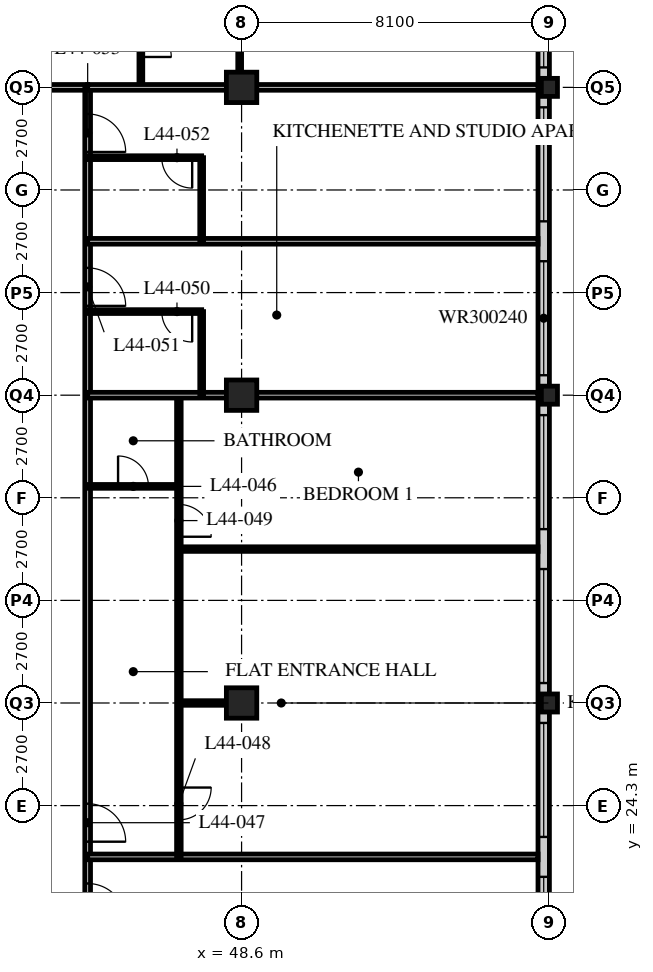
"""IFC4 building model, lengths in metres.
Left out: names, types, materials, properties, quantities, classifications, styles, units other than length and angle.
Written with IfcOpenShell. Run it as: python <this file> out.ifc"""

import sys

from ifc_helpers import new_model, si_unit, direction, frame, frame_2d, origin, origin_2d, place, context, subcontext, project, spatial, rectangle, hollow_rectangle, i_section, extrude, element, fill, save


model = new_model("IFC4")
c1 = context("Model", 3, precision=1e-05, world=origin(), true_north=direction((0.0, 1.0)))
c2 = subcontext(c1, "Body", "Model", "MODEL_VIEW")
j1 = project(units=[si_unit("LENGTHUNIT", "METRE"), si_unit("PLANEANGLEUNIT", "RADIAN")], contexts=[c1])
p1 = place(None, origin())
s1 = spatial("IfcSite", under=j1, at=p1, CompositionType="ELEMENT")
p2 = place(p1, origin())
s2 = spatial("IfcBuilding", under=s1, at=p2, CompositionType="ELEMENT")
p3 = place(p2, frame((0.0, 0.0, 174.0)))
s3 = spatial("IfcBuildingStorey", under=s2, at=p3, CompositionType="ELEMENT", Elevation=174.0)
for number, where, z_axis, x_axis in (
    (1, (48.6, 27.0, 0.0), (0.0, 0.0, 1.0), (1.0, 0.0, 0.0)),
    (2, (48.6, 35.1, 0.0), (0.0, 0.0, 1.0), (1.0, 0.0, 0.0)),
    (3, (48.6, 43.2, 0.0), (0.0, 0.0, 1.0), (1.0, 0.0, 0.0)),
):
    element("IfcColumn", number, at=place(p3, frame(where, z_axis=z_axis, x_axis=x_axis)), inside=s3, PredefinedType="COLUMN", context=c2, shape_type="SweptSolid", body=[
        extrude(hollow_rectangle(XDim=0.8, YDim=0.8, WallThickness=0.08, at=origin_2d()), origin(), (0.0, 0.0, 1.0), 3.6),
    ])
for number, where, z_axis, x_axis in (
    (4, (56.7, 27.0, 0.0), (0.0, 0.0, 1.0), (1.0, 0.0, 0.0)),
    (5, (56.7, 35.1, 0.0), (0.0, 0.0, 1.0), (1.0, 0.0, 0.0)),
    (6, (56.7, 43.2, 0.0), (0.0, 0.0, 1.0), (1.0, 0.0, 0.0)),
):
    element("IfcColumn", number, at=place(p3, frame(where, z_axis=z_axis, x_axis=x_axis)), inside=s3, PredefinedType="COLUMN", context=c2, shape_type="SweptSolid", body=[
        extrude(i_section(OverallWidth=0.424, OverallDepth=0.475, WebThickness=0.048, FlangeThickness=0.077, FilletRadius=0.015, at=origin_2d()), origin(), (0.0, 0.0, 1.0), 3.6),
    ])
p4 = place(p3, frame((56.55, 19.2, 0.0), z_axis=(0.0, 0.0, 1.0), x_axis=(0.0, 1.0, 0.0)))
e7 = element("IfcWall", 7, at=p4, inside=s3, PredefinedType="SOLIDWALL", context=c2, shape_type="SweptSolid", body=[
    extrude(rectangle(XDim=32.1, YDim=0.3, at=frame_2d((16.05, 0.0))), origin(), (0.0, 0.0, 1.0), 3.39),
])
p5 = place(p4, frame((0.225, 0.0, 0.6)))
e8 = element("IfcOpeningElement", 8, at=p5, cuts=e7, PredefinedType="OPENING", context=c2, shape_type="SweptSolid", body=[
    extrude(rectangle(XDim=3.0, YDim=2.4, at=frame_2d((1.5, 1.2))), frame((0.0, 0.16, 0.0), z_axis=(0.0, -1.0, 0.0), x_axis=(1.0, 0.0, 0.0)), (0.0, 0.0, 1.0), 0.32),
])
p6 = place(p4, frame((4.275, 0.0, 0.6)))
e9 = element("IfcOpeningElement", 9, at=p6, cuts=e7, PredefinedType="OPENING", context=c2, shape_type="SweptSolid", body=[
    extrude(rectangle(XDim=3.0, YDim=2.4, at=frame_2d((1.5, 1.2))), frame((0.0, 0.16, 0.0), z_axis=(0.0, -1.0, 0.0), x_axis=(1.0, 0.0, 0.0)), (0.0, 0.0, 1.0), 0.32),
])
p7 = place(p4, frame((8.325, 0.0, 0.6)))
e10 = element("IfcOpeningElement", 10, at=p7, cuts=e7, PredefinedType="OPENING", context=c2, shape_type="SweptSolid", body=[
    extrude(rectangle(XDim=3.0, YDim=2.4, at=frame_2d((1.5, 1.2))), frame((0.0, 0.16, 0.0), z_axis=(0.0, -1.0, 0.0), x_axis=(1.0, 0.0, 0.0)), (0.0, 0.0, 1.0), 0.32),
])
p8 = place(p4, frame((12.375, 0.0, 0.6)))
e11 = element("IfcOpeningElement", 11, at=p8, cuts=e7, PredefinedType="OPENING", context=c2, shape_type="SweptSolid", body=[
    extrude(rectangle(XDim=3.0, YDim=2.4, at=frame_2d((1.5, 1.2))), frame((0.0, 0.16, 0.0), z_axis=(0.0, -1.0, 0.0), x_axis=(1.0, 0.0, 0.0)), (0.0, 0.0, 1.0), 0.32),
])
p9 = place(p4, frame((16.425, 0.0, 0.6)))
e12 = element("IfcOpeningElement", 12, at=p9, cuts=e7, PredefinedType="OPENING", context=c2, shape_type="SweptSolid", body=[
    extrude(rectangle(XDim=3.0, YDim=2.4, at=frame_2d((1.5, 1.2))), frame((0.0, 0.16, 0.0), z_axis=(0.0, -1.0, 0.0), x_axis=(1.0, 0.0, 0.0)), (0.0, 0.0, 1.0), 0.32),
])
p10 = place(p4, frame((20.475, 0.0, 0.6)))
e13 = element("IfcOpeningElement", 13, at=p10, cuts=e7, PredefinedType="OPENING", context=c2, shape_type="SweptSolid", body=[
    extrude(rectangle(XDim=3.0, YDim=2.4, at=frame_2d((1.5, 1.2))), frame((0.0, 0.16, 0.0), z_axis=(0.0, -1.0, 0.0), x_axis=(1.0, 0.0, 0.0)), (0.0, 0.0, 1.0), 0.32),
])
p11 = place(p4, frame((24.525, 0.0, 0.6)))
e14 = element("IfcOpeningElement", 14, at=p11, cuts=e7, PredefinedType="OPENING", context=c2, shape_type="SweptSolid", body=[
    extrude(rectangle(XDim=3.0, YDim=2.4, at=frame_2d((1.5, 1.2))), frame((0.0, 0.16, 0.0), z_axis=(0.0, -1.0, 0.0), x_axis=(1.0, 0.0, 0.0)), (0.0, 0.0, 1.0), 0.32),
])
p12 = place(p4, frame((28.575, 0.0, 0.6)))
e15 = element("IfcOpeningElement", 15, at=p12, cuts=e7, PredefinedType="OPENING", context=c2, shape_type="SweptSolid", body=[
    extrude(rectangle(XDim=3.0, YDim=2.4, at=frame_2d((1.5, 1.2))), frame((0.0, 0.16, 0.0), z_axis=(0.0, -1.0, 0.0), x_axis=(1.0, 0.0, 0.0)), (0.0, 0.0, 1.0), 0.32),
])
p13 = place(p3, frame((12.15, 43.2, 0.0), z_axis=(0.0, 0.0, 1.0), x_axis=(1.0, 0.0, 0.0)))
e16 = element("IfcWall", 16, at=p13, inside=s3, PredefinedType="PARTITIONING", context=c2, shape_type="SweptSolid", body=[
    extrude(rectangle(XDim=32.4, YDim=0.15, at=frame_2d((16.2, 0.0))), origin(), (0.0, 0.0, 1.0), 2.778),
])
p14 = place(p13, frame((4.95, 0.0, 0.0)))
e17 = element("IfcOpeningElement", 17, at=p14, cuts=e16, PredefinedType="OPENING", context=c2, shape_type="SweptSolid", body=[
    extrude(rectangle(XDim=1.0, YDim=2.1, at=frame_2d((0.5, 1.05))), frame((0.0, 0.085, 0.0), z_axis=(0.0, -1.0, 0.0), x_axis=(1.0, 0.0, 0.0)), (0.0, 0.0, 1.0), 0.17),
])
p15 = place(p13, frame((13.05, 0.0, 0.0)))
e18 = element("IfcOpeningElement", 18, at=p15, cuts=e16, PredefinedType="OPENING", context=c2, shape_type="SweptSolid", body=[
    extrude(rectangle(XDim=1.0, YDim=2.1, at=frame_2d((0.5, 1.05))), frame((0.0, 0.085, 0.0), z_axis=(0.0, -1.0, 0.0), x_axis=(1.0, 0.0, 0.0)), (0.0, 0.0, 1.0), 0.17),
])
p16 = place(p13, frame((21.15, 0.0, 0.0)))
e19 = element("IfcOpeningElement", 19, at=p16, cuts=e16, PredefinedType="OPENING", context=c2, shape_type="SweptSolid", body=[
    extrude(rectangle(XDim=1.0, YDim=2.1, at=frame_2d((0.5, 1.05))), frame((0.0, 0.085, 0.0), z_axis=(0.0, -1.0, 0.0), x_axis=(1.0, 0.0, 0.0)), (0.0, 0.0, 1.0), 0.17),
])
p17 = place(p13, frame((29.875, 0.0, 0.0)))
e20 = element("IfcOpeningElement", 20, at=p17, cuts=e16, PredefinedType="OPENING", context=c2, shape_type="SweptSolid", body=[
    extrude(rectangle(XDim=1.0, YDim=2.1, at=frame_2d((0.5, 1.05))), frame((0.0, 0.085, 0.0), z_axis=(0.0, -1.0, 0.0), x_axis=(1.0, 0.0, 0.0)), (0.0, 0.0, 1.0), 0.17),
])
p18 = place(p13, frame((1.525, 0.0, 0.0)))
e21 = element("IfcOpeningElement", 21, at=p18, cuts=e16, PredefinedType="OPENING", context=c2, shape_type="SweptSolid", body=[
    extrude(rectangle(XDim=1.0, YDim=2.1, at=frame_2d((0.5, 1.05))), frame((0.0, 0.085, 0.0), z_axis=(0.0, -1.0, 0.0), x_axis=(1.0, 0.0, 0.0)), (0.0, 0.0, 1.0), 0.17),
])
p19 = place(p3, frame((44.55, 18.9, 0.0), z_axis=(0.0, 0.0, 1.0), x_axis=(0.0, 1.0, 0.0)))
e22 = element("IfcWall", 22, at=p19, inside=s3, PredefinedType="PARTITIONING", context=c2, shape_type="SweptSolid", body=[
    extrude(rectangle(XDim=24.3, YDim=0.15, at=frame_2d((12.15, 0.0))), origin(), (0.0, 0.0, 1.0), 3.39),
])
p20 = place(p19, frame((2.35, 0.0, 0.0)))
e23 = element("IfcOpeningElement", 23, at=p20, cuts=e22, PredefinedType="OPENING", context=c2, shape_type="SweptSolid", body=[
    extrude(rectangle(XDim=1.0, YDim=2.1, at=frame_2d((0.5, 1.05))), frame((0.0, 0.085, 0.0), z_axis=(0.0, -1.0, 0.0), x_axis=(1.0, 0.0, 0.0)), (0.0, 0.0, 1.0), 0.17),
])
p21 = place(p19, frame((4.45, 0.0, 0.0)))
e24 = element("IfcOpeningElement", 24, at=p21, cuts=e22, PredefinedType="OPENING", context=c2, shape_type="SweptSolid", body=[
    extrude(rectangle(XDim=1.0, YDim=2.1, at=frame_2d((0.5, 1.05))), frame((0.0, 0.085, 0.0), z_axis=(0.0, -1.0, 0.0), x_axis=(1.0, 0.0, 0.0)), (0.0, 0.0, 1.0), 0.17),
])
p22 = place(p19, frame((18.55, 0.0, 0.0)))
e25 = element("IfcOpeningElement", 25, at=p22, cuts=e22, PredefinedType="OPENING", context=c2, shape_type="SweptSolid", body=[
    extrude(rectangle(XDim=1.0, YDim=2.1, at=frame_2d((0.5, 1.05))), frame((0.0, 0.085, 0.0), z_axis=(0.0, -1.0, 0.0), x_axis=(1.0, 0.0, 0.0)), (0.0, 0.0, 1.0), 0.17),
])
p23 = place(p19, frame((22.6, 0.0, 0.0)))
e26 = element("IfcOpeningElement", 26, at=p23, cuts=e22, PredefinedType="OPENING", context=c2, shape_type="SweptSolid", body=[
    extrude(rectangle(XDim=1.0, YDim=2.1, at=frame_2d((0.5, 1.05))), frame((0.0, 0.085, 0.0), z_axis=(0.0, -1.0, 0.0), x_axis=(1.0, 0.0, 0.0)), (0.0, 0.0, 1.0), 0.17),
])
p24 = place(p3, frame((44.55, 22.95, 0.0), z_axis=(0.0, 0.0, 1.0), x_axis=(1.0, 0.0, 0.0)))
e27 = element("IfcWall", 27, at=p24, inside=s3, PredefinedType="PARTITIONING", context=c2, shape_type="SweptSolid", body=[
    extrude(rectangle(XDim=11.85, YDim=0.15, at=frame_2d((5.925, 0.0))), origin(), (0.0, 0.0, 1.0), 3.39),
])
p25 = place(p3, frame((46.95, 22.95, 0.0), z_axis=(0.0, 0.0, 1.0), x_axis=(0.0, 1.0, 0.0)))
e28 = element("IfcWall", 28, at=p25, inside=s3, PredefinedType="PARTITIONING", context=c2, shape_type="SweptSolid", body=[
    extrude(rectangle(XDim=12.15, YDim=0.12, at=frame_2d((6.075, 0.0))), origin(), (0.0, 0.0, 1.0), 3.39),
])
p26 = place(p25, frame((0.975, 0.0, 0.0)))
e29 = element("IfcOpeningElement", 29, at=p26, cuts=e28, PredefinedType="OPENING", context=c2, shape_type="SweptSolid", body=[
    extrude(rectangle(XDim=0.85, YDim=2.1, at=frame_2d((0.425, 1.05))), frame((0.0, 0.07, 0.0), z_axis=(0.0, -1.0, 0.0), x_axis=(1.0, 0.0, 0.0)), (0.0, 0.0, 1.0), 0.14),
])
p27 = place(p25, frame((8.425, 0.0, 0.0)))
e30 = element("IfcOpeningElement", 30, at=p27, cuts=e28, PredefinedType="OPENING", context=c2, shape_type="SweptSolid", body=[
    extrude(rectangle(XDim=0.85, YDim=2.1, at=frame_2d((0.425, 1.05))), frame((0.0, 0.07, 0.0), z_axis=(0.0, -1.0, 0.0), x_axis=(1.0, 0.0, 0.0)), (0.0, 0.0, 1.0), 0.14),
])
p28 = place(p3, frame((44.55, 32.7, 0.0), z_axis=(0.0, 0.0, 1.0), x_axis=(1.0, 0.0, 0.0)))
e31 = element("IfcWall", 31, at=p28, inside=s3, PredefinedType="PARTITIONING", context=c2, shape_type="SweptSolid", body=[
    extrude(rectangle(XDim=2.4, YDim=0.1, at=frame_2d((1.2, 0.0))), origin(), (0.0, 0.0, 1.0), 3.39),
])
p29 = place(p28, frame((0.8, 0.0, 0.0)))
e32 = element("IfcOpeningElement", 32, at=p29, cuts=e31, PredefinedType="OPENING", context=c2, shape_type="SweptSolid", body=[
    extrude(rectangle(XDim=0.8, YDim=2.1, at=frame_2d((0.4, 1.05))), frame((0.0, 0.06, 0.0), z_axis=(0.0, -1.0, 0.0), x_axis=(1.0, 0.0, 0.0)), (0.0, 0.0, 1.0), 0.12),
])
p30 = place(p3, frame((46.95, 31.05, 0.0), z_axis=(0.0, 0.0, 1.0), x_axis=(1.0, 0.0, 0.0)))
e33 = element("IfcWall", 33, at=p30, inside=s3, PredefinedType="PARTITIONING", context=c2, shape_type="SweptSolid", body=[
    extrude(rectangle(XDim=9.45, YDim=0.12, at=frame_2d((4.725, 0.0))), origin(), (0.0, 0.0, 1.0), 3.39),
])
p31 = place(p3, frame((44.55, 35.1, 0.0), z_axis=(0.0, 0.0, 1.0), x_axis=(1.0, 0.0, 0.0)))
e34 = element("IfcWall", 34, at=p31, inside=s3, PredefinedType="PARTITIONING", context=c2, shape_type="SweptSolid", body=[
    extrude(rectangle(XDim=11.85, YDim=0.15, at=frame_2d((5.925, 0.0))), origin(), (0.0, 0.0, 1.0), 2.778),
])
p32 = place(p3, frame((47.55, 35.1, 0.0), z_axis=(0.0, 0.0, 1.0), x_axis=(0.0, 1.0, 0.0)))
e35 = element("IfcWall", 35, at=p32, inside=s3, PredefinedType="PARTITIONING", context=c2, shape_type="SweptSolid", body=[
    extrude(rectangle(XDim=2.2, YDim=0.1, at=frame_2d((1.1, 0.0))), origin(), (0.0, 0.0, 1.0), 3.39),
])
p33 = place(p3, frame((44.55, 37.3, 0.0), z_axis=(0.0, 0.0, 1.0), x_axis=(1.0, 0.0, 0.0)))
e36 = element("IfcWall", 36, at=p33, inside=s3, PredefinedType="PARTITIONING", context=c2, shape_type="SweptSolid", body=[
    extrude(rectangle(XDim=3.0, YDim=0.1, at=frame_2d((1.5, 0.0))), origin(), (0.0, 0.0, 1.0), 3.39),
])
p34 = place(p33, frame((1.95, 0.0, 0.0)))
e37 = element("IfcOpeningElement", 37, at=p34, cuts=e36, PredefinedType="OPENING", context=c2, shape_type="SweptSolid", body=[
    extrude(rectangle(XDim=0.8, YDim=2.1, at=frame_2d((0.4, 1.05))), frame((0.0, 0.06, 0.0), z_axis=(0.0, -1.0, 0.0), x_axis=(1.0, 0.0, 0.0)), (0.0, 0.0, 1.0), 0.12),
])
p35 = place(p3, frame((44.55, 39.15, 0.0), z_axis=(0.0, 0.0, 1.0), x_axis=(1.0, 0.0, 0.0)))
e38 = element("IfcWall", 38, at=p35, inside=s3, PredefinedType="PARTITIONING", context=c2, shape_type="SweptSolid", body=[
    extrude(rectangle(XDim=11.85, YDim=0.15, at=frame_2d((5.925, 0.0))), origin(), (0.0, 0.0, 1.0), 3.39),
])
p36 = place(p3, frame((47.55, 39.15, 0.0), z_axis=(0.0, 0.0, 1.0), x_axis=(0.0, 1.0, 0.0)))
e39 = element("IfcWall", 39, at=p36, inside=s3, PredefinedType="PARTITIONING", context=c2, shape_type="SweptSolid", body=[
    extrude(rectangle(XDim=2.2, YDim=0.1, at=frame_2d((1.1, 0.0))), origin(), (0.0, 0.0, 1.0), 3.39),
])
p37 = place(p3, frame((44.55, 41.35, 0.0), z_axis=(0.0, 0.0, 1.0), x_axis=(1.0, 0.0, 0.0)))
e40 = element("IfcWall", 40, at=p37, inside=s3, PredefinedType="PARTITIONING", context=c2, shape_type="SweptSolid", body=[
    extrude(rectangle(XDim=3.0, YDim=0.1, at=frame_2d((1.5, 0.0))), origin(), (0.0, 0.0, 1.0), 3.39),
])
p38 = place(p37, frame((1.95, 0.0, 0.0)))
e41 = element("IfcOpeningElement", 41, at=p38, cuts=e40, PredefinedType="OPENING", context=c2, shape_type="SweptSolid", body=[
    extrude(rectangle(XDim=0.8, YDim=2.1, at=frame_2d((0.4, 1.05))), frame((0.0, 0.06, 0.0), z_axis=(0.0, -1.0, 0.0), x_axis=(1.0, 0.0, 0.0)), (0.0, 0.0, 1.0), 0.12),
])
p39 = place(p3, frame((45.95, 43.2, 0.0), z_axis=(0.0, 0.0, 1.0), x_axis=(0.0, 1.0, 0.0)))
e42 = element("IfcWall", 42, at=p39, inside=s3, PredefinedType="PARTITIONING", context=c2, shape_type="SweptSolid", body=[
    extrude(rectangle(XDim=2.4, YDim=0.1, at=frame_2d((1.2, 0.0))), origin(), (0.0, 0.0, 1.0), 3.39),
])
p40 = place(p39, frame((0.8, 0.0, 0.0)))
e43 = element("IfcOpeningElement", 43, at=p40, cuts=e42, PredefinedType="OPENING", context=c2, shape_type="SweptSolid", body=[
    extrude(rectangle(XDim=0.8, YDim=2.1, at=frame_2d((0.4, 1.05))), frame((0.0, 0.06, 0.0), z_axis=(0.0, -1.0, 0.0), x_axis=(1.0, 0.0, 0.0)), (0.0, 0.0, 1.0), 0.12),
])
p41 = place(p3, frame((48.55, 43.2, 0.0), z_axis=(0.0, 0.0, 1.0), x_axis=(0.0, 1.0, 0.0)))
e44 = element("IfcWall", 44, at=p41, inside=s3, PredefinedType="PARTITIONING", context=c2, shape_type="SweptSolid", body=[
    extrude(rectangle(XDim=2.4, YDim=0.1, at=frame_2d((1.2, 0.0))), origin(), (0.0, 0.0, 1.0), 2.778),
])
p42 = place(p3, frame((44.55, 43.2, 0.0), z_axis=(0.0, 0.0, 1.0), x_axis=(1.0, 0.0, 0.0)))
e45 = element("IfcWall", 45, at=p42, inside=s3, PredefinedType="PARTITIONING", context=c2, shape_type="SweptSolid", body=[
    extrude(rectangle(XDim=11.85, YDim=0.15, at=frame_2d((5.925, 0.0))), origin(), (0.0, 0.0, 1.0), 2.778),
])
p43 = place(p3, frame((46.95, 27.0, 0.0), z_axis=(0.0, 0.0, 1.0), x_axis=(1.0, 0.0, 0.0)))
e46 = element("IfcWall", 46, at=p43, inside=s3, PredefinedType="PARTITIONING", context=c2, shape_type="SweptSolid", body=[
    extrude(rectangle(XDim=1.25, YDim=0.12, at=frame_2d((0.625, 0.0))), origin(), (0.0, 0.0, 1.0), 2.778),
])
p44 = place(p5, origin())
e47 = element("IfcWindow", 47, at=p44, inside=s3, PartitioningType="SINGLE_PANEL", PredefinedType="WINDOW", context=c2, shape_type="SweptSolid", body=[
    extrude(rectangle(XDim=3.0, YDim=2.4, at=frame_2d((1.5, 1.2))), frame((0.0, 0.03, 0.0), z_axis=(0.0, -1.0, 0.0), x_axis=(1.0, 0.0, 0.0)), (0.0, 0.0, 1.0), 0.06),
])
fill(e8, e47)
p45 = place(p6, origin())
e48 = element("IfcWindow", 48, at=p45, inside=s3, PartitioningType="SINGLE_PANEL", PredefinedType="WINDOW", context=c2, shape_type="SweptSolid", body=[
    extrude(rectangle(XDim=3.0, YDim=2.4, at=frame_2d((1.5, 1.2))), frame((0.0, 0.03, 0.0), z_axis=(0.0, -1.0, 0.0), x_axis=(1.0, 0.0, 0.0)), (0.0, 0.0, 1.0), 0.06),
])
fill(e9, e48)
p46 = place(p7, origin())
e49 = element("IfcWindow", 49, at=p46, inside=s3, PartitioningType="SINGLE_PANEL", PredefinedType="WINDOW", context=c2, shape_type="SweptSolid", body=[
    extrude(rectangle(XDim=3.0, YDim=2.4, at=frame_2d((1.5, 1.2))), frame((0.0, 0.03, 0.0), z_axis=(0.0, -1.0, 0.0), x_axis=(1.0, 0.0, 0.0)), (0.0, 0.0, 1.0), 0.06),
])
fill(e10, e49)
p47 = place(p8, origin())
e50 = element("IfcWindow", 50, at=p47, inside=s3, PartitioningType="SINGLE_PANEL", PredefinedType="WINDOW", context=c2, shape_type="SweptSolid", body=[
    extrude(rectangle(XDim=3.0, YDim=2.4, at=frame_2d((1.5, 1.2))), frame((0.0, 0.03, 0.0), z_axis=(0.0, -1.0, 0.0), x_axis=(1.0, 0.0, 0.0)), (0.0, 0.0, 1.0), 0.06),
])
fill(e11, e50)
p48 = place(p9, origin())
e51 = element("IfcWindow", 51, at=p48, inside=s3, PartitioningType="SINGLE_PANEL", PredefinedType="WINDOW", context=c2, shape_type="SweptSolid", body=[
    extrude(rectangle(XDim=3.0, YDim=2.4, at=frame_2d((1.5, 1.2))), frame((0.0, 0.03, 0.0), z_axis=(0.0, -1.0, 0.0), x_axis=(1.0, 0.0, 0.0)), (0.0, 0.0, 1.0), 0.06),
])
fill(e12, e51)
p49 = place(p10, origin())
e52 = element("IfcWindow", 52, at=p49, inside=s3, PartitioningType="SINGLE_PANEL", PredefinedType="WINDOW", context=c2, shape_type="SweptSolid", body=[
    extrude(rectangle(XDim=3.0, YDim=2.4, at=frame_2d((1.5, 1.2))), frame((0.0, 0.03, 0.0), z_axis=(0.0, -1.0, 0.0), x_axis=(1.0, 0.0, 0.0)), (0.0, 0.0, 1.0), 0.06),
])
fill(e13, e52)
p50 = place(p11, origin())
e53 = element("IfcWindow", 53, at=p50, inside=s3, PartitioningType="SINGLE_PANEL", PredefinedType="WINDOW", context=c2, shape_type="SweptSolid", body=[
    extrude(rectangle(XDim=3.0, YDim=2.4, at=frame_2d((1.5, 1.2))), frame((0.0, 0.03, 0.0), z_axis=(0.0, -1.0, 0.0), x_axis=(1.0, 0.0, 0.0)), (0.0, 0.0, 1.0), 0.06),
])
fill(e14, e53)
p51 = place(p20, origin())
e54 = element("IfcDoor", 54, at=p51, inside=s3, OperationType="SINGLE_SWING_RIGHT", PredefinedType="DOOR", context=c2, shape_type="SweptSolid", body=[
    extrude(rectangle(XDim=1.0, YDim=2.1, at=frame_2d((0.5, 1.05))), frame((0.0, 0.025, 0.0), z_axis=(0.0, -1.0, 0.0), x_axis=(1.0, 0.0, 0.0)), (0.0, 0.0, 1.0), 0.05),
])
fill(e23, e54)
p52 = place(p29, origin())
e55 = element("IfcDoor", 55, at=p52, inside=s3, OperationType="SINGLE_SWING_LEFT", PredefinedType="DOOR", context=c2, shape_type="SweptSolid", body=[
    extrude(rectangle(XDim=0.8, YDim=2.1, at=frame_2d((0.4, 1.05))), frame((0.0, 0.025, 0.0), z_axis=(0.0, -1.0, 0.0), x_axis=(1.0, 0.0, 0.0)), (0.0, 0.0, 1.0), 0.05),
])
fill(e32, e55)
p53 = place(p21, origin())
e56 = element("IfcDoor", 56, at=p53, inside=s3, OperationType="SINGLE_SWING_RIGHT", PredefinedType="DOOR", context=c2, shape_type="SweptSolid", body=[
    extrude(rectangle(XDim=1.0, YDim=2.1, at=frame_2d((0.5, 1.05))), frame((0.0, 0.025, 0.0), z_axis=(0.0, -1.0, 0.0), x_axis=(1.0, 0.0, 0.0)), (0.0, 0.0, 1.0), 0.05),
])
fill(e24, e56)
p54 = place(p26, origin())
e57 = element("IfcDoor", 57, at=p54, inside=s3, OperationType="SINGLE_SWING_LEFT", PredefinedType="DOOR", context=c2, shape_type="SweptSolid", body=[
    extrude(rectangle(XDim=0.85, YDim=2.1, at=frame_2d((0.425, 1.05))), frame((0.0, 0.025, 0.0), z_axis=(0.0, -1.0, 0.0), x_axis=(1.0, 0.0, 0.0)), (0.0, 0.0, 1.0), 0.05),
])
fill(e29, e57)
p55 = place(p27, origin())
e58 = element("IfcDoor", 58, at=p55, inside=s3, OperationType="SINGLE_SWING_RIGHT", PredefinedType="DOOR", context=c2, shape_type="SweptSolid", body=[
    extrude(rectangle(XDim=0.85, YDim=2.1, at=frame_2d((0.425, 1.05))), frame((0.0, 0.025, 0.0), z_axis=(0.0, -1.0, 0.0), x_axis=(1.0, 0.0, 0.0)), (0.0, 0.0, 1.0), 0.05),
])
fill(e30, e58)
p56 = place(p34, origin())
e59 = element("IfcDoor", 59, at=p56, inside=s3, OperationType="SINGLE_SWING_LEFT", PredefinedType="DOOR", context=c2, shape_type="SweptSolid", body=[
    extrude(rectangle(XDim=0.8, YDim=2.1, at=frame_2d((0.4, 1.05))), frame((0.0, 0.025, 0.0), z_axis=(0.0, -1.0, 0.0), x_axis=(1.0, 0.0, 0.0)), (0.0, 0.0, 1.0), 0.05),
])
fill(e37, e59)
p57 = place(p22, origin())
e60 = element("IfcDoor", 60, at=p57, inside=s3, OperationType="SINGLE_SWING_RIGHT", PredefinedType="DOOR", context=c2, shape_type="SweptSolid", body=[
    extrude(rectangle(XDim=1.0, YDim=2.1, at=frame_2d((0.5, 1.05))), frame((0.0, 0.025, 0.0), z_axis=(0.0, -1.0, 0.0), x_axis=(1.0, 0.0, 0.0)), (0.0, 0.0, 1.0), 0.05),
])
fill(e25, e60)
p58 = place(p38, origin())
e61 = element("IfcDoor", 61, at=p58, inside=s3, OperationType="SINGLE_SWING_LEFT", PredefinedType="DOOR", context=c2, shape_type="SweptSolid", body=[
    extrude(rectangle(XDim=0.8, YDim=2.1, at=frame_2d((0.4, 1.05))), frame((0.0, 0.025, 0.0), z_axis=(0.0, -1.0, 0.0), x_axis=(1.0, 0.0, 0.0)), (0.0, 0.0, 1.0), 0.05),
])
fill(e41, e61)
p59 = place(p23, origin())
e62 = element("IfcDoor", 62, at=p59, inside=s3, OperationType="SINGLE_SWING_RIGHT", PredefinedType="DOOR", context=c2, shape_type="SweptSolid", body=[
    extrude(rectangle(XDim=1.0, YDim=2.1, at=frame_2d((0.5, 1.05))), frame((0.0, 0.025, 0.0), z_axis=(0.0, -1.0, 0.0), x_axis=(1.0, 0.0, 0.0)), (0.0, 0.0, 1.0), 0.05),
])
fill(e26, e62)
p60 = place(p40, origin())
e63 = element("IfcDoor", 63, at=p60, inside=s3, OperationType="SINGLE_SWING_RIGHT", PredefinedType="DOOR", context=c2, shape_type="SweptSolid", body=[
    extrude(rectangle(XDim=0.8, YDim=2.1, at=frame_2d((0.4, 1.05))), frame((0.0, 0.025, 0.0), z_axis=(0.0, -1.0, 0.0), x_axis=(1.0, 0.0, 0.0)), (0.0, 0.0, 1.0), 0.05),
])
fill(e43, e63)
save(model, sys.argv[1])
